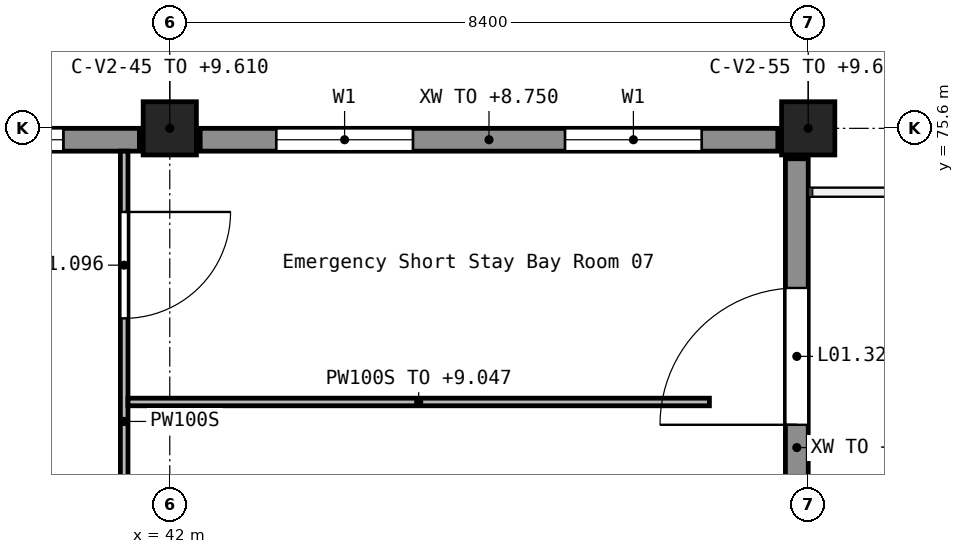
"""IFC4 building model, lengths in metres.
Left out: names, types, materials, properties, quantities, classifications, styles, units other than length and angle.
Written with IfcOpenShell. Run it as: python <this file> out.ifc"""

import sys

from ifc_helpers import new_model, si_unit, direction, frame, frame_2d, origin, origin_2d, place, context, subcontext, project, spatial, rectangle, extrude, element, fill, save


model = new_model("IFC4")
c1 = context("Model", 3, precision=1e-05, world=origin(), true_north=direction((0.0, 1.0)))
c2 = subcontext(c1, "Body", "Model", "MODEL_VIEW")
j1 = project(units=[si_unit("LENGTHUNIT", "METRE"), si_unit("PLANEANGLEUNIT", "RADIAN")], contexts=[c1])
p1 = place(None, origin())
s1 = spatial("IfcSite", under=j1, at=p1, CompositionType="ELEMENT")
p2 = place(p1, origin())
s2 = spatial("IfcBuilding", under=s1, at=p2, CompositionType="ELEMENT")
p3 = place(p2, frame((0.0, 0.0, 5.4)))
s3 = spatial("IfcBuildingStorey", under=s2, at=p3, CompositionType="ELEMENT", Elevation=5.4)
for number, where, z_axis, x_axis in (
    (1, (42.0, 75.6, 0.0), (0.0, 0.0, 1.0), (1.0, 0.0, 0.0)),
    (2, (50.4, 75.6, 0.0), (0.0, 0.0, 1.0), (1.0, 0.0, 0.0)),
):
    element("IfcColumn", number, at=place(p3, frame(where, z_axis=z_axis, x_axis=x_axis)), inside=s3, PredefinedType="COLUMN", context=c2, shape_type="SweptSolid", body=[
        extrude(rectangle(XDim=0.7, YDim=0.7, at=origin_2d()), origin(), (0.0, 0.0, 1.0), 4.21),
    ])
p4 = place(p3, frame((50.0, 75.45, 0.0), z_axis=(0.0, 0.0, 1.0), x_axis=(-1.0, 0.0, 0.0)))
e3 = element("IfcWall", 3, at=p4, inside=s3, PredefinedType="STANDARD", context=c2, shape_type="SweptSolid", body=[
    extrude(rectangle(XDim=7.6, YDim=0.3, at=frame_2d((3.8, 0.0))), origin(), (0.0, 0.0, 1.0), 3.35),
])
p5 = place(p4, frame((1.0, 0.0, 0.9)))
e4 = element("IfcOpeningElement", 4, at=p5, cuts=e3, PredefinedType="OPENING", context=c2, shape_type="SweptSolid", body=[
    extrude(rectangle(XDim=1.8, YDim=1.5, at=frame_2d((0.9, 0.75))), frame((0.0, 0.16, 0.0), z_axis=(0.0, -1.0, 0.0), x_axis=(1.0, 0.0, 0.0)), (0.0, 0.0, 1.0), 0.32),
])
p6 = place(p4, frame((4.8, 0.0, 0.9)))
e5 = element("IfcOpeningElement", 5, at=p6, cuts=e3, PredefinedType="OPENING", context=c2, shape_type="SweptSolid", body=[
    extrude(rectangle(XDim=1.8, YDim=1.5, at=frame_2d((0.9, 0.75))), frame((0.0, 0.16, 0.0), z_axis=(0.0, -1.0, 0.0), x_axis=(1.0, 0.0, 0.0)), (0.0, 0.0, 1.0), 0.32),
])
p7 = place(p3, frame((41.6, 75.45, 0.0), z_axis=(0.0, 0.0, 1.0), x_axis=(-1.0, 0.0, 0.0)))
e6 = element("IfcWall", 6, at=p7, inside=s3, PredefinedType="STANDARD", context=c2, shape_type="SweptSolid", body=[
    extrude(rectangle(XDim=7.6, YDim=0.3, at=frame_2d((3.8, 0.0))), origin(), (0.0, 0.0, 1.0), 3.35),
])
p8 = place(p7, frame((1.0, 0.0, 0.9)))
e7 = element("IfcOpeningElement", 7, at=p8, cuts=e6, PredefinedType="OPENING", context=c2, shape_type="SweptSolid", body=[
    extrude(rectangle(XDim=1.8, YDim=1.5, at=frame_2d((0.9, 0.75))), frame((0.0, 0.16, 0.0), z_axis=(0.0, -1.0, 0.0), x_axis=(1.0, 0.0, 0.0)), (0.0, 0.0, 1.0), 0.32),
])
p9 = place(p7, frame((4.8, 0.0, 0.9)))
e8 = element("IfcOpeningElement", 8, at=p9, cuts=e6, PredefinedType="OPENING", context=c2, shape_type="SweptSolid", body=[
    extrude(rectangle(XDim=1.8, YDim=1.5, at=frame_2d((0.9, 0.75))), frame((0.0, 0.16, 0.0), z_axis=(0.0, -1.0, 0.0), x_axis=(1.0, 0.0, 0.0)), (0.0, 0.0, 1.0), 0.32),
])
p10 = place(p3, frame((50.25, 67.6, 0.0), z_axis=(0.0, 0.0, 1.0), x_axis=(0.0, 1.0, 0.0)))
e9 = element("IfcWall", 9, at=p10, inside=s3, PredefinedType="STANDARD", context=c2, shape_type="SweptSolid", body=[
    extrude(rectangle(XDim=7.6, YDim=0.3, at=frame_2d((3.8, 0.0))), origin(), (0.0, 0.0, 1.0), 3.35),
])
p11 = place(p10, frame((4.1, 0.0, 0.0)))
e10 = element("IfcOpeningElement", 10, at=p11, cuts=e9, PredefinedType="OPENING", context=c2, shape_type="SweptSolid", body=[
    extrude(rectangle(XDim=1.8, YDim=2.4, at=frame_2d((0.9, 1.2))), frame((0.0, 0.16, 0.0), z_axis=(0.0, -1.0, 0.0), x_axis=(1.0, 0.0, 0.0)), (0.0, 0.0, 1.0), 0.32),
])
p12 = place(p10, frame((1.0, 0.0, 0.9)))
e11 = element("IfcOpeningElement", 11, at=p12, cuts=e9, PredefinedType="OPENING", context=c2, shape_type="SweptSolid", body=[
    extrude(rectangle(XDim=1.8, YDim=1.5, at=frame_2d((0.9, 0.75))), frame((0.0, 0.16, 0.0), z_axis=(0.0, -1.0, 0.0), x_axis=(1.0, 0.0, 0.0)), (0.0, 0.0, 1.0), 0.32),
])
p13 = place(p3, frame((41.4, 75.3, 0.0), z_axis=(0.0, 0.0, 1.0), x_axis=(0.0, -1.0, 0.0)))
e12 = element("IfcWall", 12, at=p13, inside=s3, PredefinedType="PARTITIONING", context=c2, shape_type="SweptSolid", body=[
    extrude(rectangle(XDim=18.35, YDim=0.1, at=frame_2d((9.175, 0.0))), origin(), (0.0, 0.0, 1.0), 4.15),
])
p14 = place(p13, frame((17.0, 0.0, 0.0)))
e13 = element("IfcOpeningElement", 13, at=p14, cuts=e12, PredefinedType="OPENING", context=c2, shape_type="SweptSolid", body=[
    extrude(rectangle(XDim=1.0, YDim=2.1, at=frame_2d((0.5, 1.05))), frame((0.0, 0.06, 0.0), z_axis=(0.0, -1.0, 0.0), x_axis=(1.0, 0.0, 0.0)), (0.0, 0.0, 1.0), 0.12),
])
p15 = place(p13, frame((13.05, 0.0, 0.0)))
e14 = element("IfcOpeningElement", 14, at=p15, cuts=e12, PredefinedType="OPENING", context=c2, shape_type="SweptSolid", body=[
    extrude(rectangle(XDim=0.9, YDim=2.1, at=frame_2d((0.45, 1.05))), frame((0.0, 0.06, 0.0), z_axis=(0.0, -1.0, 0.0), x_axis=(1.0, 0.0, 0.0)), (0.0, 0.0, 1.0), 0.12),
])
p16 = place(p13, frame((8.6, 0.0, 0.0)))
e15 = element("IfcOpeningElement", 15, at=p16, cuts=e12, PredefinedType="OPENING", context=c2, shape_type="SweptSolid", body=[
    extrude(rectangle(XDim=1.4, YDim=2.1, at=frame_2d((0.7, 1.05))), frame((0.0, 0.06, 0.0), z_axis=(0.0, -1.0, 0.0), x_axis=(1.0, 0.0, 0.0)), (0.0, 0.0, 1.0), 0.12),
])
p17 = place(p13, frame((5.0, 0.0, 0.0)))
e16 = element("IfcOpeningElement", 16, at=p17, cuts=e12, PredefinedType="OPENING", context=c2, shape_type="SweptSolid", body=[
    extrude(rectangle(XDim=1.4, YDim=2.1, at=frame_2d((0.7, 1.05))), frame((0.0, 0.06, 0.0), z_axis=(0.0, -1.0, 0.0), x_axis=(1.0, 0.0, 0.0)), (0.0, 0.0, 1.0), 0.12),
])
p18 = place(p13, frame((0.8, 0.0, 0.0)))
e17 = element("IfcOpeningElement", 17, at=p18, cuts=e12, PredefinedType="OPENING", context=c2, shape_type="SweptSolid", body=[
    extrude(rectangle(XDim=1.4, YDim=2.1, at=frame_2d((0.7, 1.05))), frame((0.0, 0.06, 0.0), z_axis=(0.0, -1.0, 0.0), x_axis=(1.0, 0.0, 0.0)), (0.0, 0.0, 1.0), 0.12),
])
p19 = place(p3, frame((41.45, 72.0, 0.0), z_axis=(0.0, 0.0, 1.0), x_axis=(1.0, 0.0, 0.0)))
e18 = element("IfcWall", 18, at=p19, inside=s3, PredefinedType="PARTITIONING", context=c2, shape_type="SweptSolid", body=[
    extrude(rectangle(XDim=7.65, YDim=0.1, at=frame_2d((3.825, 0.0))), origin(), (0.0, 0.0, 1.0), 3.647),
])
p20 = place(p11, origin())
e19 = element("IfcDoor", 19, at=p20, inside=s3, OperationType="SINGLE_SWING_LEFT", PredefinedType="DOOR", context=c2, shape_type="SweptSolid", body=[
    extrude(rectangle(XDim=1.8, YDim=2.4, at=frame_2d((0.9, 1.2))), frame((0.0, 0.025, 0.0), z_axis=(0.0, -1.0, 0.0), x_axis=(1.0, 0.0, 0.0)), (0.0, 0.0, 1.0), 0.05),
])
fill(e10, e19)
p21 = place(p5, origin())
e20 = element("IfcWindow", 20, at=p21, inside=s3, PartitioningType="SINGLE_PANEL", PredefinedType="WINDOW", context=c2, shape_type="SweptSolid", body=[
    extrude(rectangle(XDim=1.8, YDim=1.5, at=frame_2d((0.9, 0.75))), frame((0.0, 0.03, 0.0), z_axis=(0.0, -1.0, 0.0), x_axis=(1.0, 0.0, 0.0)), (0.0, 0.0, 1.0), 0.06),
])
fill(e4, e20)
p22 = place(p6, origin())
e21 = element("IfcWindow", 21, at=p22, inside=s3, PartitioningType="SINGLE_PANEL", PredefinedType="WINDOW", context=c2, shape_type="SweptSolid", body=[
    extrude(rectangle(XDim=1.8, YDim=1.5, at=frame_2d((0.9, 0.75))), frame((0.0, 0.03, 0.0), z_axis=(0.0, -1.0, 0.0), x_axis=(1.0, 0.0, 0.0)), (0.0, 0.0, 1.0), 0.06),
])
fill(e5, e21)
p23 = place(p8, origin())
e22 = element("IfcWindow", 22, at=p23, inside=s3, PartitioningType="SINGLE_PANEL", PredefinedType="WINDOW", context=c2, shape_type="SweptSolid", body=[
    extrude(rectangle(XDim=1.8, YDim=1.5, at=frame_2d((0.9, 0.75))), frame((0.0, 0.03, 0.0), z_axis=(0.0, -1.0, 0.0), x_axis=(1.0, 0.0, 0.0)), (0.0, 0.0, 1.0), 0.06),
])
fill(e7, e22)
p24 = place(p18, origin())
e23 = element("IfcDoor", 23, at=p24, inside=s3, OperationType="DOUBLE_DOOR_SINGLE_SWING", PredefinedType="DOOR", context=c2, shape_type="SweptSolid", body=[
    extrude(rectangle(XDim=1.4, YDim=2.1, at=frame_2d((0.7, 1.05))), frame((0.0, 0.025, 0.0), z_axis=(0.0, -1.0, 0.0), x_axis=(1.0, 0.0, 0.0)), (0.0, 0.0, 1.0), 0.05),
])
fill(e17, e23)
save(model, sys.argv[1])
